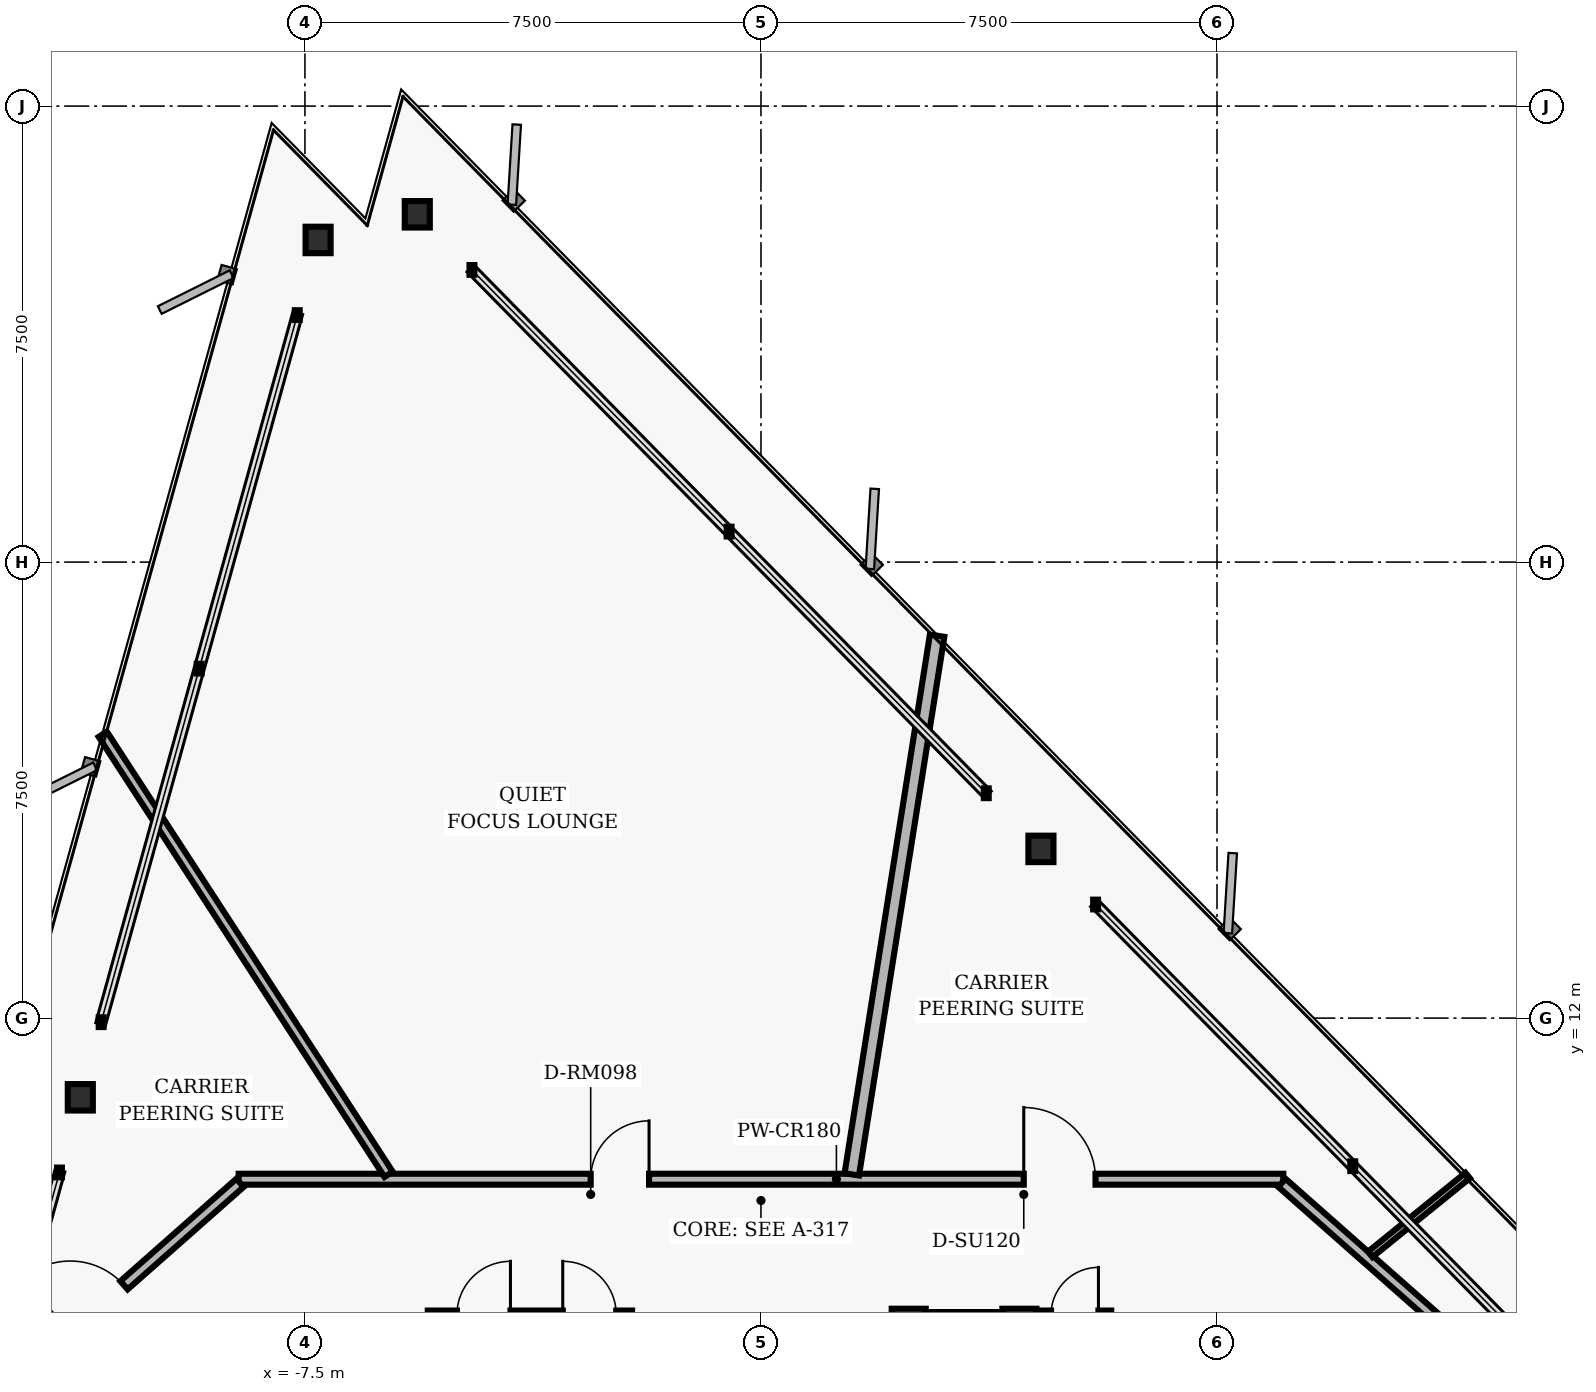
"""IFC4 building model, lengths in metres.
Left out: names, types, materials, properties, quantities, classifications, styles, units other than length and angle.
Written with IfcOpenShell. Run it as: python <this file> out.ifc"""

import sys

from ifc_helpers import new_model, si_unit, direction, frame, frame_2d, origin, origin_2d, place, context, subcontext, project, spatial, rectangle, i_section, extrude, element, fill, save


model = new_model("IFC4")
c1 = context("Model", 3, precision=1e-05, world=origin(), true_north=direction((0.0, 1.0)))
c2 = subcontext(c1, "Body", "Model", "MODEL_VIEW")
j1 = project(units=[si_unit("LENGTHUNIT", "METRE"), si_unit("PLANEANGLEUNIT", "RADIAN")], contexts=[c1])
p1 = place(None, origin())
s1 = spatial("IfcSite", under=j1, at=p1, CompositionType="ELEMENT")
p2 = place(p1, origin())
s2 = spatial("IfcBuilding", under=s1, at=p2, CompositionType="ELEMENT")
p3 = place(p2, frame((0.0, 0.0, 94.72)))
s3 = spatial("IfcBuildingStorey", under=s2, at=p3, CompositionType="ELEMENT", Elevation=94.72)
for number, where, z_axis, x_axis in (
    (1, (4.604, 14.783, 0.0), (0.0, 0.0, 1.0), (1.0, 0.0, 0.0)),
    (2, (-5.652, 25.22, 0.0), (0.0, 0.0, 1.0), (1.0, 0.0, 0.0)),
    (3, (-7.283, 24.798, 0.0), (0.0, 0.0, 1.0), (1.0, 0.0, 0.0)),
    (4, (-11.194, 10.697, 0.0), (0.0, 0.0, 1.0), (1.0, 0.0, 0.0)),
):
    element("IfcColumn", number, at=place(p3, frame(where, z_axis=z_axis, x_axis=x_axis)), inside=s3, PredefinedType="COLUMN", context=c2, shape_type="SweptSolid", body=[
        extrude(i_section(OverallWidth=0.412, OverallDepth=0.435, WebThickness=0.036, FlangeThickness=0.057, FilletRadius=0.022, at=origin_2d()), origin(), (0.0, 0.0, 1.0), 3.04),
    ])
p4 = place(p3, frame((2.15, 7.12, 0.0), z_axis=(0.0, 0.0, 1.0), x_axis=(1.0, 0.0, 0.0)))
e5 = element("IfcWall", 5, at=p4, inside=s3, PredefinedType="PARTITIONING", context=c2, shape_type="SweptSolid", body=[
    extrude(rectangle(XDim=2.38, YDim=0.2, at=frame_2d((1.19, 0.0))), origin(), (0.0, 0.0, 1.0), 2.763),
])
p5 = place(p4, frame((0.56, 0.0, 0.0)))
e6 = element("IfcOpeningElement", 6, at=p5, cuts=e5, PredefinedType="OPENING", context=c2, shape_type="SweptSolid", body=[
    extrude(rectangle(XDim=1.26, YDim=2.06, at=frame_2d((0.63, 1.03))), frame((0.0, 0.11, 0.0), z_axis=(0.0, -1.0, 0.0), x_axis=(1.0, 0.0, 0.0)), (0.0, 0.0, 1.0), 0.22),
])
p6 = place(p3, frame((-5.48, 7.12, 0.0), z_axis=(0.0, 0.0, 1.0), x_axis=(1.0, 0.0, 0.0)))
e7 = element("IfcWall", 7, at=p6, inside=s3, PredefinedType="PARTITIONING", context=c2, shape_type="SweptSolid", body=[
    extrude(rectangle(XDim=3.36, YDim=0.14, at=frame_2d((1.68, 0.0))), origin(), (0.0, 0.0, 1.0), 2.763),
])
p7 = place(p6, frame((0.48, 0.0, 0.0)))
e8 = element("IfcOpeningElement", 8, at=p7, cuts=e7, PredefinedType="OPENING", context=c2, shape_type="SweptSolid", body=[
    extrude(rectangle(XDim=0.88, YDim=2.02, at=frame_2d((0.44, 1.01))), frame((0.0, 0.08, 0.0), z_axis=(0.0, -1.0, 0.0), x_axis=(1.0, 0.0, 0.0)), (0.0, 0.0, 1.0), 0.16),
])
p8 = place(p6, frame((2.22, 0.0, 0.0)))
e9 = element("IfcOpeningElement", 9, at=p8, cuts=e7, PredefinedType="OPENING", context=c2, shape_type="SweptSolid", body=[
    extrude(rectangle(XDim=0.88, YDim=2.02, at=frame_2d((0.44, 1.01))), frame((0.0, 0.08, 0.0), z_axis=(0.0, -1.0, 0.0), x_axis=(1.0, 0.0, 0.0)), (0.0, 0.0, 1.0), 0.16),
])
p9 = place(p3, frame((4.56, 7.12, 0.0), z_axis=(0.0, 0.0, 1.0), x_axis=(1.0, 0.0, 0.0)))
e10 = element("IfcWall", 10, at=p9, inside=s3, PredefinedType="PARTITIONING", context=c2, shape_type="SweptSolid", body=[
    extrude(rectangle(XDim=1.2, YDim=0.14, at=frame_2d((0.6, 0.0))), origin(), (0.0, 0.0, 1.0), 2.763),
])
p10 = place(p9, frame((0.21, 0.0, 0.0)))
e11 = element("IfcOpeningElement", 11, at=p10, cuts=e10, PredefinedType="OPENING", context=c2, shape_type="SweptSolid", body=[
    extrude(rectangle(XDim=0.78, YDim=2.01, at=frame_2d((0.39, 1.005))), frame((0.0, 0.08, 0.0), z_axis=(0.0, -1.0, 0.0), x_axis=(1.0, 0.0, 0.0)), (0.0, 0.0, 1.0), 0.16),
])
p11 = place(p3, frame((-8.59, 9.35, 0.0), z_axis=(0.0, 0.0, 1.0), x_axis=(1.0, 0.0, 0.0)))
e12 = element("IfcWall", 12, at=p11, inside=s3, PredefinedType="PARTITIONING", context=c2, shape_type="SweptSolid", body=[
    extrude(rectangle(XDim=17.18, YDim=0.18, at=frame_2d((8.59, 0.0))), origin(), (0.0, 0.0, 1.0), 2.277),
])
p12 = place(p11, frame((12.912, 0.0, 0.0)))
e13 = element("IfcOpeningElement", 13, at=p12, cuts=e12, PredefinedType="OPENING", context=c2, shape_type="SweptSolid", body=[
    extrude(rectangle(XDim=1.18, YDim=2.02, at=frame_2d((0.59, 1.01))), frame((0.0, 0.1, 0.0), z_axis=(0.0, -1.0, 0.0), x_axis=(1.0, 0.0, 0.0)), (0.0, 0.0, 1.0), 0.2),
])
p13 = place(p11, frame((5.79, 0.0, 0.0)))
e14 = element("IfcOpeningElement", 14, at=p13, cuts=e12, PredefinedType="OPENING", context=c2, shape_type="SweptSolid", body=[
    extrude(rectangle(XDim=0.96, YDim=2.02, at=frame_2d((0.48, 1.01))), frame((0.0, 0.1, 0.0), z_axis=(0.0, -1.0, 0.0), x_axis=(1.0, 0.0, 0.0)), (0.0, 0.0, 1.0), 0.2),
])
p14 = place(p3, frame((8.567, 9.29, 0.0), z_axis=(0.0, 0.0, 1.0), x_axis=(0.749626463267, -0.66186113768, 0.0)))
e15 = element("IfcWall", 15, at=p14, inside=s3, PredefinedType="PARTITIONING", context=c2, shape_type="SweptSolid", body=[
    extrude(rectangle(XDim=6.27, YDim=0.18, at=frame_2d((3.135, 0.0))), origin(), (0.0, 0.0, 1.0), 2.277),
])
p15 = place(p3, frame((-13.268, 5.14, 0.0), z_axis=(0.0, 0.0, 1.0), x_axis=(0.749626463267, 0.66186113768, 0.0)))
e16 = element("IfcWall", 16, at=p15, inside=s3, PredefinedType="PARTITIONING", context=c2, shape_type="SweptSolid", body=[
    extrude(rectangle(XDim=6.27, YDim=0.18, at=frame_2d((3.135, 0.0))), origin(), (0.0, 0.0, 1.0), 2.763),
])
p16 = place(p15, frame((2.545, 0.0, 0.0)))
e17 = element("IfcOpeningElement", 17, at=p16, cuts=e16, PredefinedType="OPENING", context=c2, shape_type="SweptSolid", body=[
    extrude(rectangle(XDim=1.18, YDim=2.02, at=frame_2d((0.59, 1.01))), frame((0.0, 0.1, 0.0), z_axis=(0.0, -1.0, 0.0), x_axis=(1.0, 0.0, 0.0)), (0.0, 0.0, 1.0), 0.2),
])
p17 = place(p3, frame((10.02, 8.114, 0.0), z_axis=(0.0, 0.0, 1.0), x_axis=(0.777156579316, 0.62930727886, 0.0)))
e18 = element("IfcWall", 18, at=p17, inside=s3, PredefinedType="MOVABLE", context=c2, shape_type="SweptSolid", body=[
    extrude(rectangle(XDim=2.061, YDim=0.115, at=frame_2d((1.03, 0.0))), origin(), (0.0, 0.0, 1.0), 2.763),
])
p18 = place(p3, frame((1.494, 9.43, 0.0), z_axis=(0.0, 0.0, 1.0), x_axis=(0.156413985488, 0.98769158402, 0.0)))
e19 = element("IfcWall", 19, at=p18, inside=s3, PredefinedType="PARTITIONING", context=c2, shape_type="SweptSolid", body=[
    extrude(rectangle(XDim=8.97, YDim=0.24, at=frame_2d((4.485, 0.0))), origin(), (0.0, 0.0, 1.0), 2.763),
])
p19 = place(p3, frame((-6.124, 9.43, 0.0), z_axis=(0.0, 0.0, 1.0), x_axis=(-0.544640325453, 0.838669729924, 0.0)))
e20 = element("IfcWall", 20, at=p19, inside=s3, PredefinedType="PARTITIONING", context=c2, shape_type="SweptSolid", body=[
    extrude(rectangle(XDim=8.631, YDim=0.16, at=frame_2d((4.316, 0.0))), origin(), (0.0, 0.0, 1.0), 2.763),
])
p20 = place(p12, origin())
e21 = element("IfcDoor", 21, at=p20, inside=s3, OperationType="SINGLE_SWING_LEFT", PredefinedType="DOOR", context=c2, shape_type="SweptSolid", body=[
    extrude(rectangle(XDim=1.18, YDim=2.02, at=frame_2d((0.59, 1.01))), frame((0.0, 0.025, 0.0), z_axis=(0.0, -1.0, 0.0), x_axis=(1.0, 0.0, 0.0)), (0.0, 0.0, 1.0), 0.05),
])
fill(e13, e21)
p21 = place(p13, origin())
e22 = element("IfcDoor", 22, at=p21, inside=s3, OperationType="SINGLE_SWING_RIGHT", PredefinedType="DOOR", context=c2, shape_type="SweptSolid", body=[
    extrude(rectangle(XDim=0.96, YDim=2.02, at=frame_2d((0.48, 1.01))), frame((0.0, 0.025, 0.0), z_axis=(0.0, -1.0, 0.0), x_axis=(1.0, 0.0, 0.0)), (0.0, 0.0, 1.0), 0.05),
])
fill(e14, e22)
p22 = place(p16, origin())
e23 = element("IfcDoor", 23, at=p22, inside=s3, OperationType="SINGLE_SWING_LEFT", PredefinedType="DOOR", context=c2, shape_type="SweptSolid", body=[
    extrude(rectangle(XDim=1.18, YDim=2.02, at=frame_2d((0.59, 1.01))), frame((0.0, 0.025, 0.0), z_axis=(0.0, -1.0, 0.0), x_axis=(1.0, 0.0, 0.0)), (0.0, 0.0, 1.0), 0.05),
])
fill(e17, e23)
save(model, sys.argv[1])
